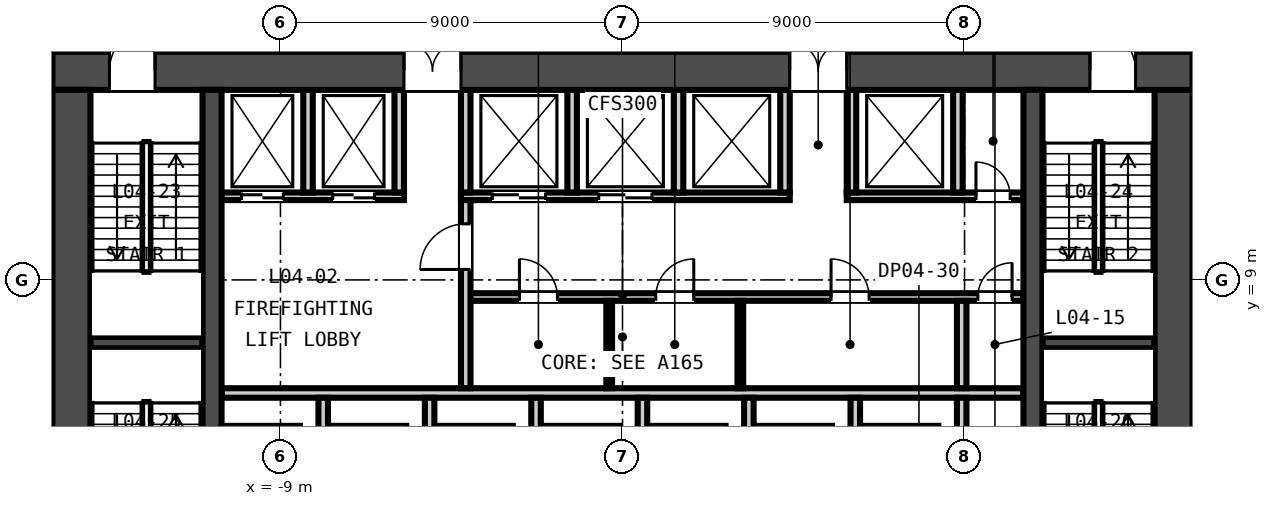
"""IFC4 building model, lengths in metres.
Left out: names, types, materials, properties, quantities, classifications, styles, units other than length and angle.
Written with IfcOpenShell. Run it as: python <this file> out.ifc"""

import sys

from ifc_helpers import new_model, si_unit, direction, frame, frame_2d, origin, place, context, subcontext, project, spatial, rectangle, extrude, element, fill, save


model = new_model("IFC4")
c1 = context("Model", 3, precision=1e-05, world=origin(), true_north=direction((0.0, 1.0)))
c2 = subcontext(c1, "Body", "Model", "MODEL_VIEW")
j1 = project(units=[si_unit("LENGTHUNIT", "METRE"), si_unit("PLANEANGLEUNIT", "RADIAN")], contexts=[c1])
p1 = place(None, origin())
s1 = spatial("IfcSite", under=j1, at=p1, CompositionType="ELEMENT")
p2 = place(p1, origin())
s2 = spatial("IfcBuilding", under=s1, at=p2, CompositionType="ELEMENT")
p3 = place(p2, frame((0.0, 0.0, 27.0)))
s3 = spatial("IfcBuildingStorey", under=s2, at=p3, CompositionType="ELEMENT", Elevation=27.0)
p4 = place(p3, frame((-15.0, 14.5, -0.3), z_axis=(0.0, 0.0, 1.0), x_axis=(1.0, 0.0, 0.0)))
e1 = element("IfcWall", 1, at=p4, inside=s3, PredefinedType="SOLIDWALL", context=c2, shape_type="SweptSolid", body=[
    extrude(rectangle(XDim=30.0, YDim=1.0, at=frame_2d((15.0, 0.0))), origin(), (0.0, 0.0, 1.0), 4.5),
])
p5 = place(p4, frame((9.25, 0.0, 0.3)))
e2 = element("IfcOpeningElement", 2, at=p5, cuts=e1, PredefinedType="OPENING", context=c2, shape_type="SweptSolid", body=[
    extrude(rectangle(XDim=1.5, YDim=2.1, at=frame_2d((0.75, 1.05))), frame((0.0, 0.51, 0.0), z_axis=(0.0, -1.0, 0.0), x_axis=(1.0, 0.0, 0.0)), (0.0, 0.0, 1.0), 1.02),
])
p6 = place(p4, frame((19.4, 0.0, 0.3)))
e3 = element("IfcOpeningElement", 3, at=p6, cuts=e1, PredefinedType="OPENING", context=c2, shape_type="SweptSolid", body=[
    extrude(rectangle(XDim=1.5, YDim=2.1, at=frame_2d((0.75, 1.05))), frame((0.0, 0.51, 0.0), z_axis=(0.0, -1.0, 0.0), x_axis=(1.0, 0.0, 0.0)), (0.0, 0.0, 1.0), 1.02),
])
p7 = place(p4, frame((1.5, 0.0, 0.3)))
e4 = element("IfcOpeningElement", 4, at=p7, cuts=e1, PredefinedType="OPENING", context=c2, shape_type="SweptSolid", body=[
    extrude(rectangle(XDim=1.2, YDim=2.1, at=frame_2d((0.6, 1.05))), frame((0.0, 0.51, 0.0), z_axis=(0.0, -1.0, 0.0), x_axis=(1.0, 0.0, 0.0)), (0.0, 0.0, 1.0), 1.02),
])
p8 = place(p4, frame((27.3, 0.0, 0.3)))
e5 = element("IfcOpeningElement", 5, at=p8, cuts=e1, PredefinedType="OPENING", context=c2, shape_type="SweptSolid", body=[
    extrude(rectangle(XDim=1.2, YDim=2.1, at=frame_2d((0.6, 1.05))), frame((0.0, 0.51, 0.0), z_axis=(0.0, -1.0, 0.0), x_axis=(1.0, 0.0, 0.0)), (0.0, 0.0, 1.0), 1.02),
])
for number, where, z_axis, x_axis in (
    (6, (-14.5, 1.0, -0.3), (0.0, 0.0, 1.0), (0.0, 1.0, 0.0)),
    (7, (14.5, 1.0, -0.3), (0.0, 0.0, 1.0), (0.0, 1.0, 0.0)),
):
    element("IfcWall", number, at=place(p3, frame(where, z_axis=z_axis, x_axis=x_axis)), inside=s3, PredefinedType="SOLIDWALL", context=c2, shape_type="SweptSolid", body=[
        extrude(rectangle(XDim=13.0, YDim=1.0, at=frame_2d((6.5, 0.0))), origin(), (0.0, 0.0, 1.0), 4.5),
    ])
for number, where, z_axis, x_axis in (
    (8, (-10.8, 1.0, -0.3), (0.0, 0.0, 1.0), (0.0, 1.0, 0.0)),
    (9, (10.8, 1.0, -0.3), (0.0, 0.0, 1.0), (0.0, 1.0, 0.0)),
):
    element("IfcWall", number, at=place(p3, frame(where, z_axis=z_axis, x_axis=x_axis)), inside=s3, PredefinedType="SOLIDWALL", context=c2, shape_type="SweptSolid", body=[
        extrude(rectangle(XDim=13.0, YDim=0.5, at=frame_2d((6.5, 0.0))), origin(), (0.0, 0.0, 1.0), 4.5),
    ])
p9 = place(p3, frame((-10.55, 6.025, 0.0), z_axis=(0.0, 0.0, 1.0), x_axis=(1.0, 0.0, 0.0)))
e10 = element("IfcWall", 10, at=p9, inside=s3, PredefinedType="PARTITIONING", context=c2, shape_type="SweptSolid", body=[
    extrude(rectangle(XDim=21.1, YDim=0.25, at=frame_2d((10.55, 0.0))), origin(), (0.0, 0.0, 1.0), 4.2),
])
p10 = place(p3, frame((-4.125, 8.55, 0.0), z_axis=(0.0, 0.0, 1.0), x_axis=(1.0, 0.0, 0.0)))
e11 = element("IfcWall", 11, at=p10, inside=s3, PredefinedType="PARTITIONING", context=c2, shape_type="SweptSolid", body=[
    extrude(rectangle(XDim=14.675, YDim=0.2, at=frame_2d((7.337, 0.0))), origin(), (0.0, 0.0, 1.0), 4.2),
])
p11 = place(p10, frame((1.413, 0.0, 0.0)))
e12 = element("IfcOpeningElement", 12, at=p11, cuts=e11, PredefinedType="OPENING", context=c2, shape_type="SweptSolid", body=[
    extrude(rectangle(XDim=1.0, YDim=2.1, at=frame_2d((0.5, 1.05))), frame((0.0, 0.11, 0.0), z_axis=(0.0, -1.0, 0.0), x_axis=(1.0, 0.0, 0.0)), (0.0, 0.0, 1.0), 0.22),
])
p12 = place(p10, frame((5.0, 0.0, 0.0)))
e13 = element("IfcOpeningElement", 13, at=p12, cuts=e11, PredefinedType="OPENING", context=c2, shape_type="SweptSolid", body=[
    extrude(rectangle(XDim=1.0, YDim=2.1, at=frame_2d((0.5, 1.05))), frame((0.0, 0.11, 0.0), z_axis=(0.0, -1.0, 0.0), x_axis=(1.0, 0.0, 0.0)), (0.0, 0.0, 1.0), 0.22),
])
p13 = place(p10, frame((9.613, 0.0, 0.0)))
e14 = element("IfcOpeningElement", 14, at=p13, cuts=e11, PredefinedType="OPENING", context=c2, shape_type="SweptSolid", body=[
    extrude(rectangle(XDim=1.0, YDim=2.1, at=frame_2d((0.5, 1.05))), frame((0.0, 0.11, 0.0), z_axis=(0.0, -1.0, 0.0), x_axis=(1.0, 0.0, 0.0)), (0.0, 0.0, 1.0), 0.22),
])
p14 = place(p10, frame((13.475, 0.0, 0.0)))
e15 = element("IfcOpeningElement", 15, at=p14, cuts=e11, PredefinedType="OPENING", context=c2, shape_type="SweptSolid", body=[
    extrude(rectangle(XDim=0.9, YDim=2.1, at=frame_2d((0.45, 1.05))), frame((0.0, 0.11, 0.0), z_axis=(0.0, -1.0, 0.0), x_axis=(1.0, 0.0, 0.0)), (0.0, 0.0, 1.0), 0.22),
])
p15 = place(p3, frame((-10.55, 11.2, 0.0), z_axis=(0.0, 0.0, 1.0), x_axis=(1.0, 0.0, 0.0)))
e16 = element("IfcWall", 16, at=p15, inside=s3, PredefinedType="PARTITIONING", context=c2, shape_type="SweptSolid", body=[
    extrude(rectangle(XDim=4.8, YDim=0.2, at=frame_2d((2.4, 0.0))), origin(), (0.0, 0.0, 1.0), 4.2),
])
p16 = place(p15, frame((0.525, 0.0, 0.0)))
e17 = element("IfcOpeningElement", 17, at=p16, cuts=e16, PredefinedType="OPENING", context=c2, shape_type="SweptSolid", body=[
    extrude(rectangle(XDim=1.1, YDim=2.1, at=frame_2d((0.55, 1.05))), frame((0.0, 0.11, 0.0), z_axis=(0.0, -1.0, 0.0), x_axis=(1.0, 0.0, 0.0)), (0.0, 0.0, 1.0), 0.22),
])
p17 = place(p15, frame((2.925, 0.0, 0.0)))
e18 = element("IfcOpeningElement", 18, at=p17, cuts=e16, PredefinedType="OPENING", context=c2, shape_type="SweptSolid", body=[
    extrude(rectangle(XDim=1.1, YDim=2.1, at=frame_2d((0.55, 1.05))), frame((0.0, 0.11, 0.0), z_axis=(0.0, -1.0, 0.0), x_axis=(1.0, 0.0, 0.0)), (0.0, 0.0, 1.0), 0.22),
])
p18 = place(p3, frame((-4.25, 11.2, 0.0), z_axis=(0.0, 0.0, 1.0), x_axis=(1.0, 0.0, 0.0)))
e19 = element("IfcWall", 19, at=p18, inside=s3, PredefinedType="PARTITIONING", context=c2, shape_type="SweptSolid", body=[
    extrude(rectangle(XDim=8.65, YDim=0.2, at=frame_2d((4.325, 0.0))), origin(), (0.0, 0.0, 1.0), 4.2),
])
p19 = place(p18, frame((0.825, 0.0, 0.0)))
e20 = element("IfcOpeningElement", 20, at=p19, cuts=e19, PredefinedType="OPENING", context=c2, shape_type="SweptSolid", body=[
    extrude(rectangle(XDim=1.4, YDim=2.1, at=frame_2d((0.7, 1.05))), frame((0.0, 0.11, 0.0), z_axis=(0.0, -1.0, 0.0), x_axis=(1.0, 0.0, 0.0)), (0.0, 0.0, 1.0), 0.22),
])
p20 = place(p18, frame((3.625, 0.0, 0.0)))
e21 = element("IfcOpeningElement", 21, at=p20, cuts=e19, PredefinedType="OPENING", context=c2, shape_type="SweptSolid", body=[
    extrude(rectangle(XDim=1.4, YDim=2.1, at=frame_2d((0.7, 1.05))), frame((0.0, 0.11, 0.0), z_axis=(0.0, -1.0, 0.0), x_axis=(1.0, 0.0, 0.0)), (0.0, 0.0, 1.0), 0.22),
])
p21 = place(p3, frame((5.9, 11.2, 0.0), z_axis=(0.0, 0.0, 1.0), x_axis=(1.0, 0.0, 0.0)))
e22 = element("IfcWall", 22, at=p21, inside=s3, PredefinedType="PARTITIONING", context=c2, shape_type="SweptSolid", body=[
    extrude(rectangle(XDim=4.65, YDim=0.2, at=frame_2d((2.325, 0.0))), origin(), (0.0, 0.0, 1.0), 4.2),
])
p22 = place(p21, frame((3.4, 0.0, 0.0)))
e23 = element("IfcOpeningElement", 23, at=p22, cuts=e22, PredefinedType="OPENING", context=c2, shape_type="SweptSolid", body=[
    extrude(rectangle(XDim=0.9, YDim=2.1, at=frame_2d((0.45, 1.05))), frame((0.0, 0.11, 0.0), z_axis=(0.0, -1.0, 0.0), x_axis=(1.0, 0.0, 0.0)), (0.0, 0.0, 1.0), 0.22),
])
p23 = place(p3, frame((-4.125, 6.15, 0.0), z_axis=(0.0, 0.0, 1.0), x_axis=(0.0, 1.0, 0.0)))
e24 = element("IfcWall", 24, at=p23, inside=s3, PredefinedType="PARTITIONING", context=c2, shape_type="SweptSolid", body=[
    extrude(rectangle(XDim=4.95, YDim=0.25, at=frame_2d((2.475, 0.0))), origin(), (0.0, 0.0, 1.0), 4.2),
])
p24 = place(p23, frame((3.125, 0.0, 0.0)))
e25 = element("IfcOpeningElement", 25, at=p24, cuts=e24, PredefinedType="OPENING", context=c2, shape_type="SweptSolid", body=[
    extrude(rectangle(XDim=1.2, YDim=2.1, at=frame_2d((0.6, 1.05))), frame((0.0, 0.135, 0.0), z_axis=(0.0, -1.0, 0.0), x_axis=(1.0, 0.0, 0.0)), (0.0, 0.0, 1.0), 0.27),
])
for number, where, z_axis, x_axis in (
    (26, (-7.875, 3.6, 0.0), (0.0, 0.0, 1.0), (0.0, 1.0, 0.0)),
    (27, (-5.075, 3.6, 0.0), (0.0, 0.0, 1.0), (0.0, 1.0, 0.0)),
    (28, (-2.275, 3.6, 0.0), (0.0, 0.0, 1.0), (0.0, 1.0, 0.0)),
    (29, (0.525, 3.6, 0.0), (0.0, 0.0, 1.0), (0.0, 1.0, 0.0)),
    (30, (3.325, 3.6, 0.0), (0.0, 0.0, 1.0), (0.0, 1.0, 0.0)),
    (31, (6.125, 3.6, 0.0), (0.0, 0.0, 1.0), (0.0, 1.0, 0.0)),
    (32, (8.925, 3.6, 0.0), (0.0, 0.0, 1.0), (0.0, 1.0, 0.0)),
):
    element("IfcWall", number, at=place(p3, frame(where, z_axis=z_axis, x_axis=x_axis)), inside=s3, PredefinedType="PARTITIONING", context=c2, shape_type="SweptSolid", body=[
        extrude(rectangle(XDim=2.3, YDim=0.25, at=frame_2d((1.15, 0.0))), origin(), (0.0, 0.0, 1.0), 4.2),
    ])
for number, where, z_axis, x_axis in (
    (33, (-0.35, 6.15, 0.0), (0.0, 0.0, 1.0), (0.0, 1.0, 0.0)),
    (34, (3.1, 6.15, 0.0), (0.0, 0.0, 1.0), (0.0, 1.0, 0.0)),
):
    element("IfcWall", number, at=place(p3, frame(where, z_axis=z_axis, x_axis=x_axis)), inside=s3, PredefinedType="PARTITIONING", context=c2, shape_type="SweptSolid", body=[
        extrude(rectangle(XDim=2.3, YDim=0.15, at=frame_2d((1.15, 0.0))), origin(), (0.0, 0.0, 1.0), 4.2),
    ])
p25 = place(p3, frame((8.925, 6.15, 0.0), z_axis=(0.0, 0.0, 1.0), x_axis=(0.0, 1.0, 0.0)))
e35 = element("IfcWall", 35, at=p25, inside=s3, PredefinedType="PARTITIONING", context=c2, shape_type="SweptSolid", body=[
    extrude(rectangle(XDim=2.3, YDim=0.25, at=frame_2d((1.15, 0.0))), origin(), (0.0, 0.0, 1.0), 4.2),
])
for number, where, z_axis, x_axis in (
    (36, (-8.275, 11.3, 0.0), (0.0, 0.0, 1.0), (0.0, 1.0, 0.0)),
    (37, (-5.875, 11.3, 0.0), (0.0, 0.0, 1.0), (0.0, 1.0, 0.0)),
    (38, (-4.125, 11.3, 0.0), (0.0, 0.0, 1.0), (0.0, 1.0, 0.0)),
    (39, (-1.325, 11.3, 0.0), (0.0, 0.0, 1.0), (0.0, 1.0, 0.0)),
    (40, (1.475, 11.3, 0.0), (0.0, 0.0, 1.0), (0.0, 1.0, 0.0)),
    (41, (4.275, 11.3, 0.0), (0.0, 0.0, 1.0), (0.0, 1.0, 0.0)),
    (42, (6.025, 11.3, 0.0), (0.0, 0.0, 1.0), (0.0, 1.0, 0.0)),
    (43, (8.825, 11.3, 0.0), (0.0, 0.0, 1.0), (0.0, 1.0, 0.0)),
):
    element("IfcWall", number, at=place(p3, frame(where, z_axis=z_axis, x_axis=x_axis)), inside=s3, PredefinedType="PARTITIONING", context=c2, shape_type="SweptSolid", body=[
        extrude(rectangle(XDim=2.7, YDim=0.25, at=frame_2d((1.35, 0.0))), origin(), (0.0, 0.0, 1.0), 4.2),
    ])
for number, where, z_axis, x_axis in (
    (44, (-14.0, 7.35, -0.3), (0.0, 0.0, 1.0), (1.0, 0.0, 0.0)),
    (45, (11.05, 7.35, -0.3), (0.0, 0.0, 1.0), (1.0, 0.0, 0.0)),
):
    element("IfcWall", number, at=place(p3, frame(where, z_axis=z_axis, x_axis=x_axis)), inside=s3, PredefinedType="SOLIDWALL", context=c2, shape_type="SweptSolid", body=[
        extrude(rectangle(XDim=2.95, YDim=0.3, at=frame_2d((1.475, 0.0))), origin(), (0.0, 0.0, 1.0), 4.5),
    ])
p26 = place(p24, origin())
e46 = element("IfcDoor", 46, at=p26, inside=s3, OperationType="SINGLE_SWING_LEFT", PredefinedType="DOOR", context=c2, shape_type="SweptSolid", body=[
    extrude(rectangle(XDim=1.2, YDim=2.1, at=frame_2d((0.6, 1.05))), frame((0.0, 0.025, 0.0), z_axis=(0.0, -1.0, 0.0), x_axis=(1.0, 0.0, 0.0)), (0.0, 0.0, 1.0), 0.05),
])
fill(e25, e46)
p27 = place(p11, origin())
e47 = element("IfcDoor", 47, at=p27, inside=s3, OperationType="SINGLE_SWING_LEFT", PredefinedType="DOOR", context=c2, shape_type="SweptSolid", body=[
    extrude(rectangle(XDim=1.0, YDim=2.1, at=frame_2d((0.5, 1.05))), frame((0.0, 0.025, 0.0), z_axis=(0.0, -1.0, 0.0), x_axis=(1.0, 0.0, 0.0)), (0.0, 0.0, 1.0), 0.05),
])
fill(e12, e47)
p28 = place(p12, origin())
e48 = element("IfcDoor", 48, at=p28, inside=s3, OperationType="SINGLE_SWING_RIGHT", PredefinedType="DOOR", context=c2, shape_type="SweptSolid", body=[
    extrude(rectangle(XDim=1.0, YDim=2.1, at=frame_2d((0.5, 1.05))), frame((0.0, 0.025, 0.0), z_axis=(0.0, -1.0, 0.0), x_axis=(1.0, 0.0, 0.0)), (0.0, 0.0, 1.0), 0.05),
])
fill(e13, e48)
p29 = place(p13, origin())
e49 = element("IfcDoor", 49, at=p29, inside=s3, OperationType="SINGLE_SWING_LEFT", PredefinedType="DOOR", context=c2, shape_type="SweptSolid", body=[
    extrude(rectangle(XDim=1.0, YDim=2.1, at=frame_2d((0.5, 1.05))), frame((0.0, 0.025, 0.0), z_axis=(0.0, -1.0, 0.0), x_axis=(1.0, 0.0, 0.0)), (0.0, 0.0, 1.0), 0.05),
])
fill(e14, e49)
p30 = place(p14, origin())
e50 = element("IfcDoor", 50, at=p30, inside=s3, OperationType="SINGLE_SWING_RIGHT", PredefinedType="DOOR", context=c2, shape_type="SweptSolid", body=[
    extrude(rectangle(XDim=0.9, YDim=2.1, at=frame_2d((0.45, 1.05))), frame((0.0, 0.025, 0.0), z_axis=(0.0, -1.0, 0.0), x_axis=(1.0, 0.0, 0.0)), (0.0, 0.0, 1.0), 0.05),
])
fill(e15, e50)
p31 = place(p16, origin())
e51 = element("IfcDoor", 51, at=p31, inside=s3, OperationType="DOUBLE_DOOR_SLIDING", PredefinedType="DOOR", context=c2, shape_type="SweptSolid", body=[
    extrude(rectangle(XDim=1.1, YDim=2.1, at=frame_2d((0.55, 1.05))), frame((0.0, 0.025, 0.0), z_axis=(0.0, -1.0, 0.0), x_axis=(1.0, 0.0, 0.0)), (0.0, 0.0, 1.0), 0.05),
])
fill(e17, e51)
p32 = place(p17, origin())
e52 = element("IfcDoor", 52, at=p32, inside=s3, OperationType="DOUBLE_DOOR_SLIDING", PredefinedType="DOOR", context=c2, shape_type="SweptSolid", body=[
    extrude(rectangle(XDim=1.1, YDim=2.1, at=frame_2d((0.55, 1.05))), frame((0.0, 0.025, 0.0), z_axis=(0.0, -1.0, 0.0), x_axis=(1.0, 0.0, 0.0)), (0.0, 0.0, 1.0), 0.05),
])
fill(e18, e52)
p33 = place(p19, origin())
e53 = element("IfcDoor", 53, at=p33, inside=s3, OperationType="DOUBLE_DOOR_SLIDING", PredefinedType="DOOR", context=c2, shape_type="SweptSolid", body=[
    extrude(rectangle(XDim=1.4, YDim=2.1, at=frame_2d((0.7, 1.05))), frame((0.0, 0.025, 0.0), z_axis=(0.0, -1.0, 0.0), x_axis=(1.0, 0.0, 0.0)), (0.0, 0.0, 1.0), 0.05),
])
fill(e20, e53)
p34 = place(p20, origin())
e54 = element("IfcDoor", 54, at=p34, inside=s3, OperationType="DOUBLE_DOOR_SLIDING", PredefinedType="DOOR", context=c2, shape_type="SweptSolid", body=[
    extrude(rectangle(XDim=1.4, YDim=2.1, at=frame_2d((0.7, 1.05))), frame((0.0, 0.025, 0.0), z_axis=(0.0, -1.0, 0.0), x_axis=(1.0, 0.0, 0.0)), (0.0, 0.0, 1.0), 0.05),
])
fill(e21, e54)
p35 = place(p22, origin())
e55 = element("IfcDoor", 55, at=p35, inside=s3, OperationType="SINGLE_SWING_LEFT", PredefinedType="DOOR", context=c2, shape_type="SweptSolid", body=[
    extrude(rectangle(XDim=0.9, YDim=2.1, at=frame_2d((0.45, 1.05))), frame((0.0, 0.025, 0.0), z_axis=(0.0, -1.0, 0.0), x_axis=(1.0, 0.0, 0.0)), (0.0, 0.0, 1.0), 0.05),
])
fill(e23, e55)
p36 = place(p5, origin())
e56 = element("IfcDoor", 56, at=p36, inside=s3, OperationType="DOUBLE_DOOR_SINGLE_SWING", PredefinedType="DOOR", context=c2, shape_type="SweptSolid", body=[
    extrude(rectangle(XDim=1.5, YDim=2.1, at=frame_2d((0.75, 1.05))), frame((0.0, 0.025, 0.0), z_axis=(0.0, -1.0, 0.0), x_axis=(1.0, 0.0, 0.0)), (0.0, 0.0, 1.0), 0.05),
])
fill(e2, e56)
p37 = place(p6, origin())
e57 = element("IfcDoor", 57, at=p37, inside=s3, OperationType="DOUBLE_DOOR_SINGLE_SWING", PredefinedType="DOOR", context=c2, shape_type="SweptSolid", body=[
    extrude(rectangle(XDim=1.5, YDim=2.1, at=frame_2d((0.75, 1.05))), frame((0.0, 0.025, 0.0), z_axis=(0.0, -1.0, 0.0), x_axis=(1.0, 0.0, 0.0)), (0.0, 0.0, 1.0), 0.05),
])
fill(e3, e57)
p38 = place(p7, origin())
e58 = element("IfcDoor", 58, at=p38, inside=s3, OperationType="SINGLE_SWING_RIGHT", PredefinedType="DOOR", context=c2, shape_type="SweptSolid", body=[
    extrude(rectangle(XDim=1.2, YDim=2.1, at=frame_2d((0.6, 1.05))), frame((0.0, 0.025, 0.0), z_axis=(0.0, -1.0, 0.0), x_axis=(1.0, 0.0, 0.0)), (0.0, 0.0, 1.0), 0.05),
])
fill(e4, e58)
p39 = place(p8, origin())
e59 = element("IfcDoor", 59, at=p39, inside=s3, OperationType="SINGLE_SWING_LEFT", PredefinedType="DOOR", context=c2, shape_type="SweptSolid", body=[
    extrude(rectangle(XDim=1.2, YDim=2.1, at=frame_2d((0.6, 1.05))), frame((0.0, 0.025, 0.0), z_axis=(0.0, -1.0, 0.0), x_axis=(1.0, 0.0, 0.0)), (0.0, 0.0, 1.0), 0.05),
])
fill(e5, e59)
save(model, sys.argv[1])
